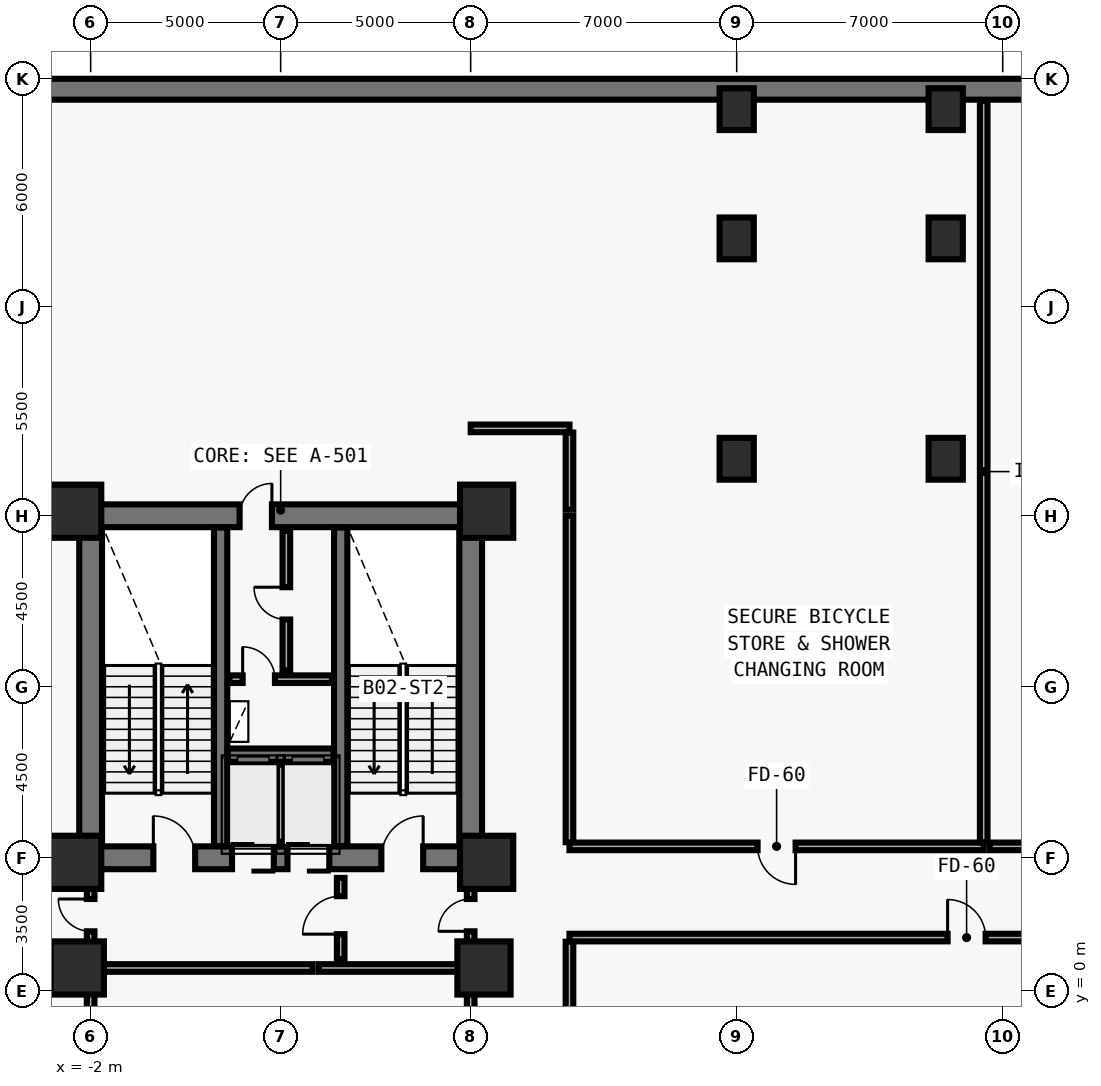
"""IFC4 building model, lengths in metres.
Left out: names, types, materials, properties, quantities, classifications, styles, units other than length and angle.
Written with IfcOpenShell. Run it as: python <this file> out.ifc"""

import sys

from ifc_helpers import new_model, si_unit, direction, frame, frame_2d, origin, origin_2d, place, context, subcontext, project, spatial, rectangle, extrude, element, fill, save


model = new_model("IFC4")
c1 = context("Model", 3, precision=1e-05, world=origin(), true_north=direction((0.0, 1.0)))
c2 = subcontext(c1, "Body", "Model", "MODEL_VIEW")
j1 = project(units=[si_unit("LENGTHUNIT", "METRE"), si_unit("PLANEANGLEUNIT", "RADIAN")], contexts=[c1])
p1 = place(None, origin())
s1 = spatial("IfcSite", under=j1, at=p1, CompositionType="ELEMENT")
p2 = place(p1, origin())
s2 = spatial("IfcBuilding", under=s1, at=p2, CompositionType="ELEMENT")
p3 = place(p2, frame((0.0, 0.0, -9.0)))
s3 = spatial("IfcBuildingStorey", under=s2, at=p3, CompositionType="ELEMENT", Elevation=-9.0)
p4 = place(p3, frame((-2.0, 3.5, 0.0), z_axis=(0.0, 0.0, 1.0), x_axis=(1.0, 0.0, 0.0)))
e1 = element("IfcWall", 1, at=p4, inside=s3, PredefinedType="SHEAR", context=c2, shape_type="SweptSolid", body=[
    extrude(rectangle(XDim=10.0, YDim=0.6, at=frame_2d((5.0, 0.0))), origin(), (0.0, 0.0, 1.0), 4.492),
])
p5 = place(p4, frame((1.65, 0.0, 0.0)))
e2 = element("IfcOpeningElement", 2, at=p5, cuts=e1, PredefinedType="OPENING", context=c2, shape_type="SweptSolid", body=[
    extrude(rectangle(XDim=1.1, YDim=2.15, at=frame_2d((0.55, 1.075))), frame((0.0, 0.31, 0.0), z_axis=(0.0, -1.0, 0.0), x_axis=(1.0, 0.0, 0.0)), (0.0, 0.0, 1.0), 0.62),
])
p6 = place(p4, frame((7.65, 0.0, 0.0)))
e3 = element("IfcOpeningElement", 3, at=p6, cuts=e1, PredefinedType="OPENING", context=c2, shape_type="SweptSolid", body=[
    extrude(rectangle(XDim=1.1, YDim=2.15, at=frame_2d((0.55, 1.075))), frame((0.0, 0.31, 0.0), z_axis=(0.0, -1.0, 0.0), x_axis=(1.0, 0.0, 0.0)), (0.0, 0.0, 1.0), 0.62),
])
p7 = place(p4, frame((3.72, 0.0, 0.0)))
e4 = element("IfcOpeningElement", 4, at=p7, cuts=e1, PredefinedType="OPENING", context=c2, shape_type="SweptSolid", body=[
    extrude(rectangle(XDim=1.1, YDim=2.2, at=frame_2d((0.55, 1.1))), frame((0.0, 0.31, 0.0), z_axis=(0.0, -1.0, 0.0), x_axis=(1.0, 0.0, 0.0)), (0.0, 0.0, 1.0), 0.62),
])
p8 = place(p4, frame((5.18, 0.0, 0.0)))
e5 = element("IfcOpeningElement", 5, at=p8, cuts=e1, PredefinedType="OPENING", context=c2, shape_type="SweptSolid", body=[
    extrude(rectangle(XDim=1.1, YDim=2.2, at=frame_2d((0.55, 1.1))), frame((0.0, 0.31, 0.0), z_axis=(0.0, -1.0, 0.0), x_axis=(1.0, 0.0, 0.0)), (0.0, 0.0, 1.0), 0.62),
])
p9 = place(p3, frame((-2.0, 12.5, 0.0), z_axis=(0.0, 0.0, 1.0), x_axis=(1.0, 0.0, 0.0)))
e6 = element("IfcWall", 6, at=p9, inside=s3, PredefinedType="SHEAR", context=c2, shape_type="SweptSolid", body=[
    extrude(rectangle(XDim=10.0, YDim=0.6, at=frame_2d((5.0, 0.0))), origin(), (0.0, 0.0, 1.0), 4.492),
])
p10 = place(p9, frame((3.92, 0.0, 0.0)))
e7 = element("IfcOpeningElement", 7, at=p10, cuts=e6, PredefinedType="OPENING", context=c2, shape_type="SweptSolid", body=[
    extrude(rectangle(XDim=0.85, YDim=2.1, at=frame_2d((0.425, 1.05))), frame((0.0, 0.31, 0.0), z_axis=(0.0, -1.0, 0.0), x_axis=(1.0, 0.0, 0.0)), (0.0, 0.0, 1.0), 0.62),
])
for number, where, z_axis, x_axis in (
    (8, (-2.0, 3.81, 0.0), (0.0, 0.0, 1.0), (0.0, 1.0, 0.0)),
    (9, (8.0, 3.81, 0.0), (0.0, 0.0, 1.0), (0.0, 1.0, 0.0)),
):
    element("IfcWall", number, at=place(p3, frame(where, z_axis=z_axis, x_axis=x_axis)), inside=s3, PredefinedType="SHEAR", context=c2, shape_type="SweptSolid", body=[
        extrude(rectangle(XDim=8.38, YDim=0.6, at=frame_2d((4.19, 0.0))), origin(), (0.0, 0.0, 1.0), 4.492),
    ])
for number, where, z_axis, x_axis in (
    (10, (1.42, 3.81, 0.0), (0.0, 0.0, 1.0), (0.0, 1.0, 0.0)),
    (11, (4.58, 3.81, 0.0), (0.0, 0.0, 1.0), (0.0, 1.0, 0.0)),
):
    element("IfcWall", number, at=place(p3, frame(where, z_axis=z_axis, x_axis=x_axis)), inside=s3, PredefinedType="SHEAR", context=c2, shape_type="SweptSolid", body=[
        extrude(rectangle(XDim=8.38, YDim=0.35, at=frame_2d((4.19, 0.0))), origin(), (0.0, 0.0, 1.0), 4.492),
    ])
p11 = place(p3, frame((1.61, 6.2, 0.0), z_axis=(0.0, 0.0, 1.0), x_axis=(1.0, 0.0, 0.0)))
e12 = element("IfcWall", 12, at=p11, inside=s3, PredefinedType="SHEAR", context=c2, shape_type="SweptSolid", body=[
    extrude(rectangle(XDim=2.78, YDim=0.35, at=frame_2d((1.39, 0.0))), origin(), (0.0, 0.0, 1.0), 4.492),
])
p12 = place(p3, frame((-33.725, 23.725, 0.0), z_axis=(0.0, 0.0, 1.0), x_axis=(1.0, 0.0, 0.0)))
e13 = element("IfcWall", 13, at=p12, inside=s3, PredefinedType="SOLIDWALL", context=c2, shape_type="SweptSolid", body=[
    extrude(rectangle(XDim=67.45, YDim=0.55, at=frame_2d((33.725, 0.0))), origin(), (0.0, 0.0, 1.0), 4.492),
])
for number, where, z_axis, x_axis in (
    (14, (-2.42, 12.62, 0.0), (0.0, 0.0, 1.0), (1.0, 0.0, 0.0)),
    (15, (8.42, 12.62, 0.0), (0.0, 0.0, 1.0), (1.0, 0.0, 0.0)),
    (16, (-2.42, 3.38, 0.0), (0.0, 0.0, 1.0), (1.0, 0.0, 0.0)),
    (17, (8.42, 3.38, 0.0), (0.0, 0.0, 1.0), (1.0, 0.0, 0.0)),
    (18, (-2.35, 0.6, 0.0), (0.0, 0.0, 1.0), (1.0, 0.0, 0.0)),
    (19, (8.35, 0.6, 0.0), (0.0, 0.0, 1.0), (1.0, 0.0, 0.0)),
):
    element("IfcColumn", number, at=place(p3, frame(where, z_axis=z_axis, x_axis=x_axis)), inside=s3, PredefinedType="COLUMN", context=c2, shape_type="SweptSolid", body=[
        extrude(rectangle(XDim=1.4, YDim=1.4, at=origin_2d()), origin(), (0.0, 0.0, 1.0), 4.475),
    ])
for number, where, z_axis, x_axis in (
    (20, (15.0, 14.0, 0.0), (0.0, 0.0, 1.0), (1.0, 0.0, 0.0)),
    (21, (15.0, 19.8, 0.0), (0.0, 0.0, 1.0), (1.0, 0.0, 0.0)),
    (22, (15.0, 23.2, 0.0), (0.0, 0.0, 1.0), (1.0, 0.0, 0.0)),
    (23, (20.5, 14.0, 0.0), (0.0, 0.0, 1.0), (1.0, 0.0, 0.0)),
    (24, (20.5, 19.8, 0.0), (0.0, 0.0, 1.0), (1.0, 0.0, 0.0)),
    (25, (20.5, 23.2, 0.0), (0.0, 0.0, 1.0), (1.0, 0.0, 0.0)),
):
    element("IfcColumn", number, at=place(p3, frame(where, z_axis=z_axis, x_axis=x_axis)), inside=s3, PredefinedType="COLUMN", context=c2, shape_type="SweptSolid", body=[
        extrude(rectangle(XDim=0.9, YDim=1.1, at=origin_2d()), origin(), (0.0, 0.0, 1.0), 4.475),
    ])
p13 = place(p3, frame((3.0, 3.92, 0.0), z_axis=(0.0, 0.0, 1.0), x_axis=(0.0, 1.0, 0.0)))
e26 = element("IfcWall", 26, at=p13, inside=s3, PredefinedType="SOLIDWALL", context=c2, shape_type="SweptSolid", body=[
    extrude(rectangle(XDim=2.03, YDim=0.2, at=frame_2d((1.015, 0.0))), origin(), (0.0, 0.0, 1.0), 4.18),
])
p14 = place(p3, frame((4.0, 0.6, 0.0), z_axis=(0.0, 0.0, 1.0), x_axis=(1.0, 0.0, 0.0)))
e27 = element("IfcWall", 27, at=p14, inside=s3, PredefinedType="SOLIDWALL", context=c2, shape_type="SweptSolid", body=[
    extrude(rectangle(XDim=3.88, YDim=0.2, at=frame_2d((1.94, 0.0))), origin(), (0.0, 0.0, 1.0), 3.362),
])
p15 = place(p3, frame((1.65, 8.2, 0.0), z_axis=(0.0, 0.0, 1.0), x_axis=(1.0, 0.0, 0.0)))
e28 = element("IfcWall", 28, at=p15, inside=s3, PredefinedType="MOVABLE", context=c2, shape_type="SweptSolid", body=[
    extrude(rectangle(XDim=2.7, YDim=0.2, at=frame_2d((1.35, 0.0))), origin(), (0.0, 0.0, 1.0), 4.18),
])
p16 = place(p15, frame((0.35, 0.0, 0.0)))
e29 = element("IfcOpeningElement", 29, at=p16, cuts=e28, PredefinedType="OPENING", context=c2, shape_type="SweptSolid", body=[
    extrude(rectangle(XDim=0.85, YDim=2.1, at=frame_2d((0.425, 1.05))), frame((0.0, 0.11, 0.0), z_axis=(0.0, -1.0, 0.0), x_axis=(1.0, 0.0, 0.0)), (0.0, 0.0, 1.0), 0.22),
])
p17 = place(p3, frame((3.15, 8.43, 0.0), z_axis=(0.0, 0.0, 1.0), x_axis=(0.0, 1.0, 0.0)))
e30 = element("IfcWall", 30, at=p17, inside=s3, PredefinedType="MOVABLE", context=c2, shape_type="SweptSolid", body=[
    extrude(rectangle(XDim=3.67, YDim=0.2, at=frame_2d((1.835, 0.0))), origin(), (0.0, 0.0, 1.0), 4.18),
])
p18 = place(p17, frame((1.34, 0.0, 0.0)))
e31 = element("IfcOpeningElement", 31, at=p18, cuts=e30, PredefinedType="OPENING", context=c2, shape_type="SweptSolid", body=[
    extrude(rectangle(XDim=0.85, YDim=2.1, at=frame_2d((0.425, 1.05))), frame((0.0, 0.11, 0.0), z_axis=(0.0, -1.0, 0.0), x_axis=(1.0, 0.0, 0.0)), (0.0, 0.0, 1.0), 0.22),
])
p19 = place(p3, frame((4.58, 0.83, 0.0), z_axis=(0.0, 0.0, 1.0), x_axis=(0.0, 1.0, 0.0)))
e32 = element("IfcWall", 32, at=p19, inside=s3, PredefinedType="MOVABLE", context=c2, shape_type="SweptSolid", body=[
    extrude(rectangle(XDim=2.14, YDim=0.2, at=frame_2d((1.07, 0.0))), origin(), (0.0, 0.0, 1.0), 4.18),
])
p20 = place(p19, frame((0.66, 0.0, 0.0)))
e33 = element("IfcOpeningElement", 33, at=p20, cuts=e32, PredefinedType="OPENING", context=c2, shape_type="SweptSolid", body=[
    extrude(rectangle(XDim=1.0, YDim=2.1, at=frame_2d((0.5, 1.05))), frame((0.0, 0.11, 0.0), z_axis=(0.0, -1.0, 0.0), x_axis=(1.0, 0.0, 0.0)), (0.0, 0.0, 1.0), 0.22),
])
p21 = place(p3, frame((-2.0, 0.72, 0.0), z_axis=(0.0, 0.0, 1.0), x_axis=(0.0, 1.0, 0.0)))
e34 = element("IfcWall", 34, at=p21, inside=s3, PredefinedType="MOVABLE", context=c2, shape_type="SweptSolid", body=[
    extrude(rectangle(XDim=2.25, YDim=0.2, at=frame_2d((1.125, 0.0))), origin(), (0.0, 0.0, 1.0), 3.262),
])
p22 = place(p21, frame((0.845, 0.0, 0.0)))
e35 = element("IfcOpeningElement", 35, at=p22, cuts=e34, PredefinedType="OPENING", context=c2, shape_type="SweptSolid", body=[
    extrude(rectangle(XDim=0.85, YDim=2.1, at=frame_2d((0.425, 1.05))), frame((0.0, 0.11, 0.0), z_axis=(0.0, -1.0, 0.0), x_axis=(1.0, 0.0, 0.0)), (0.0, 0.0, 1.0), 0.22),
])
p23 = place(p3, frame((8.0, 0.72, 0.0), z_axis=(0.0, 0.0, 1.0), x_axis=(0.0, 1.0, 0.0)))
e36 = element("IfcWall", 36, at=p23, inside=s3, PredefinedType="MOVABLE", context=c2, shape_type="SweptSolid", body=[
    extrude(rectangle(XDim=2.25, YDim=0.2, at=frame_2d((1.125, 0.0))), origin(), (0.0, 0.0, 1.0), 3.262),
])
p24 = place(p23, frame((0.845, 0.0, 0.0)))
e37 = element("IfcOpeningElement", 37, at=p24, cuts=e36, PredefinedType="OPENING", context=c2, shape_type="SweptSolid", body=[
    extrude(rectangle(XDim=0.85, YDim=2.1, at=frame_2d((0.425, 1.05))), frame((0.0, 0.11, 0.0), z_axis=(0.0, -1.0, 0.0), x_axis=(1.0, 0.0, 0.0)), (0.0, 0.0, 1.0), 0.22),
])
p25 = place(p3, frame((10.6, 1.4, 0.0), z_axis=(0.0, 0.0, 1.0), x_axis=(1.0, 0.0, 0.0)))
e38 = element("IfcWall", 38, at=p25, inside=s3, PredefinedType="MOVABLE", context=c2, shape_type="SweptSolid", body=[
    extrude(rectangle(XDim=20.9, YDim=0.2, at=frame_2d((10.45, 0.0))), origin(), (0.0, 0.0, 1.0), 4.18),
])
p26 = place(p25, frame((9.95, 0.0, 0.0)))
e39 = element("IfcOpeningElement", 39, at=p26, cuts=e38, PredefinedType="OPENING", context=c2, shape_type="SweptSolid", body=[
    extrude(rectangle(XDim=1.0, YDim=2.1, at=frame_2d((0.5, 1.05))), frame((0.0, 0.11, 0.0), z_axis=(0.0, -1.0, 0.0), x_axis=(1.0, 0.0, 0.0)), (0.0, 0.0, 1.0), 0.22),
])
p27 = place(p3, frame((21.5, 3.8, 0.0), z_axis=(0.0, 0.0, 1.0), x_axis=(-1.0, 0.0, 0.0)))
e40 = element("IfcWall", 40, at=p27, inside=s3, PredefinedType="MOVABLE", context=c2, shape_type="SweptSolid", body=[
    extrude(rectangle(XDim=10.9, YDim=0.2, at=frame_2d((5.45, 0.0))), origin(), (0.0, 0.0, 1.0), 4.18),
])
p28 = place(p27, frame((4.95, 0.0, 0.0)))
e41 = element("IfcOpeningElement", 41, at=p28, cuts=e40, PredefinedType="OPENING", context=c2, shape_type="SweptSolid", body=[
    extrude(rectangle(XDim=1.0, YDim=2.1, at=frame_2d((0.5, 1.05))), frame((0.0, 0.11, 0.0), z_axis=(0.0, -1.0, 0.0), x_axis=(1.0, 0.0, 0.0)), (0.0, 0.0, 1.0), 0.22),
])
p29 = place(p3, frame((31.5, 3.8, 0.0), z_axis=(0.0, 0.0, 1.0), x_axis=(-1.0, 0.0, 0.0)))
e42 = element("IfcWall", 42, at=p29, inside=s3, PredefinedType="MOVABLE", context=c2, shape_type="SweptSolid", body=[
    extrude(rectangle(XDim=9.84, YDim=0.2, at=frame_2d((4.92, 0.0))), origin(), (0.0, 0.0, 1.0), 4.18),
])
p30 = place(p29, frame((4.5, 0.0, 0.0)))
e43 = element("IfcOpeningElement", 43, at=p30, cuts=e42, PredefinedType="OPENING", context=c2, shape_type="SweptSolid", body=[
    extrude(rectangle(XDim=1.0, YDim=2.1, at=frame_2d((0.5, 1.05))), frame((0.0, 0.11, 0.0), z_axis=(0.0, -1.0, 0.0), x_axis=(1.0, 0.0, 0.0)), (0.0, 0.0, 1.0), 0.22),
])
p31 = place(p3, frame((-1.88, 0.6, 0.0), z_axis=(0.0, 0.0, 1.0), x_axis=(1.0, 0.0, 0.0)))
e44 = element("IfcWall", 44, at=p31, inside=s3, PredefinedType="MOVABLE", context=c2, shape_type="SweptSolid", body=[
    extrude(rectangle(XDim=5.72, YDim=0.2, at=frame_2d((2.86, 0.0))), origin(), (0.0, 0.0, 1.0), 3.362),
])
for number, where, z_axis, x_axis in (
    (45, (-2.0, -4.09, 0.0), (0.0, 0.0, 1.0), (0.0, 1.0, 0.0)),
    (46, (8.0, -4.09, 0.0), (0.0, 0.0, 1.0), (0.0, 1.0, 0.0)),
):
    element("IfcWall", number, at=place(p3, frame(where, z_axis=z_axis, x_axis=x_axis)), inside=s3, PredefinedType="MOVABLE", context=c2, shape_type="SweptSolid", body=[
        extrude(rectangle(XDim=4.59, YDim=0.2, at=frame_2d((2.295, 0.0))), origin(), (0.0, 0.0, 1.0), 3.362),
    ])
p32 = place(p3, frame((10.6, -4.2, 0.0), z_axis=(0.0, 0.0, 1.0), x_axis=(0.0, 1.0, 0.0)))
e47 = element("IfcWall", 47, at=p32, inside=s3, PredefinedType="MOVABLE", context=c2, shape_type="SweptSolid", body=[
    extrude(rectangle(XDim=5.49, YDim=0.2, at=frame_2d((2.745, 0.0))), origin(), (0.0, 0.0, 1.0), 4.18),
])
p33 = place(p3, frame((-2.36, 3.8, 0.0), z_axis=(0.0, 0.0, 1.0), x_axis=(-1.0, 0.0, 0.0)))
e48 = element("IfcWall", 48, at=p33, inside=s3, PredefinedType="MOVABLE", context=c2, shape_type="SweptSolid", body=[
    extrude(rectangle(XDim=2.08, YDim=0.2, at=frame_2d((1.04, 0.0))), origin(), (0.0, 0.0, 1.0), 4.18),
])
p34 = place(p3, frame((10.6, 3.91, 0.0), z_axis=(0.0, 0.0, 1.0), x_axis=(0.0, 1.0, 0.0)))
e49 = element("IfcWall", 49, at=p34, inside=s3, PredefinedType="MOVABLE", context=c2, shape_type="SweptSolid", body=[
    extrude(rectangle(XDim=8.59, YDim=0.2, at=frame_2d((4.295, 0.0))), origin(), (0.0, 0.0, 1.0), 4.18),
])
p35 = place(p3, frame((10.6, 14.8, 0.0), z_axis=(0.0, 0.0, 1.0), x_axis=(-1.0, 0.0, 0.0)))
e50 = element("IfcWall", 50, at=p35, inside=s3, PredefinedType="MOVABLE", context=c2, shape_type="SweptSolid", body=[
    extrude(rectangle(XDim=2.6, YDim=0.2, at=frame_2d((1.3, 0.0))), origin(), (0.0, 0.0, 1.0), 4.18),
])
p36 = place(p3, frame((10.6, 12.66, 0.0), z_axis=(0.0, 0.0, 1.0), x_axis=(0.0, 1.0, 0.0)))
e51 = element("IfcWall", 51, at=p36, inside=s3, PredefinedType="MOVABLE", context=c2, shape_type="SweptSolid", body=[
    extrude(rectangle(XDim=2.03, YDim=0.2, at=frame_2d((1.015, 0.0))), origin(), (0.0, 0.0, 1.0), 4.18),
])
p37 = place(p3, frame((21.5, 23.415, 0.0), z_axis=(0.0, 0.0, 1.0), x_axis=(0.0, -1.0, 0.0)))
e52 = element("IfcWall", 52, at=p37, inside=s3, PredefinedType="MOVABLE", context=c2, shape_type="SweptSolid", body=[
    extrude(rectangle(XDim=19.505, YDim=0.2, at=frame_2d((9.752, 0.0))), origin(), (0.0, 0.0, 1.0), 4.18),
])
p38 = place(p5, origin())
e53 = element("IfcDoor", 53, at=p38, inside=s3, OperationType="SINGLE_SWING_LEFT", PredefinedType="DOOR", context=c2, shape_type="SweptSolid", body=[
    extrude(rectangle(XDim=1.1, YDim=2.15, at=frame_2d((0.55, 1.075))), frame((0.0, 0.025, 0.0), z_axis=(0.0, -1.0, 0.0), x_axis=(1.0, 0.0, 0.0)), (0.0, 0.0, 1.0), 0.05),
])
fill(e2, e53)
p39 = place(p6, origin())
e54 = element("IfcDoor", 54, at=p39, inside=s3, OperationType="SINGLE_SWING_RIGHT", PredefinedType="DOOR", context=c2, shape_type="SweptSolid", body=[
    extrude(rectangle(XDim=1.1, YDim=2.15, at=frame_2d((0.55, 1.075))), frame((0.0, 0.025, 0.0), z_axis=(0.0, -1.0, 0.0), x_axis=(1.0, 0.0, 0.0)), (0.0, 0.0, 1.0), 0.05),
])
fill(e3, e54)
p40 = place(p7, origin())
e55 = element("IfcDoor", 55, at=p40, inside=s3, OperationType="DOUBLE_DOOR_SLIDING", PredefinedType="DOOR", context=c2, shape_type="SweptSolid", body=[
    extrude(rectangle(XDim=1.1, YDim=2.2, at=frame_2d((0.55, 1.1))), frame((0.0, 0.025, 0.0), z_axis=(0.0, -1.0, 0.0), x_axis=(1.0, 0.0, 0.0)), (0.0, 0.0, 1.0), 0.05),
])
fill(e4, e55)
p41 = place(p8, origin())
e56 = element("IfcDoor", 56, at=p41, inside=s3, OperationType="DOUBLE_DOOR_SLIDING", PredefinedType="DOOR", context=c2, shape_type="SweptSolid", body=[
    extrude(rectangle(XDim=1.1, YDim=2.2, at=frame_2d((0.55, 1.1))), frame((0.0, 0.025, 0.0), z_axis=(0.0, -1.0, 0.0), x_axis=(1.0, 0.0, 0.0)), (0.0, 0.0, 1.0), 0.05),
])
fill(e5, e56)
p42 = place(p10, origin())
e57 = element("IfcDoor", 57, at=p42, inside=s3, OperationType="SINGLE_SWING_RIGHT", PredefinedType="DOOR", context=c2, shape_type="SweptSolid", body=[
    extrude(rectangle(XDim=0.85, YDim=2.1, at=frame_2d((0.425, 1.05))), frame((0.0, 0.025, 0.0), z_axis=(0.0, -1.0, 0.0), x_axis=(1.0, 0.0, 0.0)), (0.0, 0.0, 1.0), 0.05),
])
fill(e7, e57)
p43 = place(p16, origin())
e58 = element("IfcDoor", 58, at=p43, inside=s3, OperationType="SINGLE_SWING_LEFT", PredefinedType="DOOR", context=c2, shape_type="SweptSolid", body=[
    extrude(rectangle(XDim=0.85, YDim=2.1, at=frame_2d((0.425, 1.05))), frame((0.0, 0.025, 0.0), z_axis=(0.0, -1.0, 0.0), x_axis=(1.0, 0.0, 0.0)), (0.0, 0.0, 1.0), 0.05),
])
fill(e29, e58)
p44 = place(p18, origin())
e59 = element("IfcDoor", 59, at=p44, inside=s3, OperationType="SINGLE_SWING_RIGHT", PredefinedType="DOOR", context=c2, shape_type="SweptSolid", body=[
    extrude(rectangle(XDim=0.85, YDim=2.1, at=frame_2d((0.425, 1.05))), frame((0.0, 0.025, 0.0), z_axis=(0.0, -1.0, 0.0), x_axis=(1.0, 0.0, 0.0)), (0.0, 0.0, 1.0), 0.05),
])
fill(e31, e59)
p45 = place(p20, origin())
e60 = element("IfcDoor", 60, at=p45, inside=s3, OperationType="SINGLE_SWING_LEFT", PredefinedType="DOOR", context=c2, shape_type="SweptSolid", body=[
    extrude(rectangle(XDim=1.0, YDim=2.1, at=frame_2d((0.5, 1.05))), frame((0.0, 0.025, 0.0), z_axis=(0.0, -1.0, 0.0), x_axis=(1.0, 0.0, 0.0)), (0.0, 0.0, 1.0), 0.05),
])
fill(e33, e60)
p46 = place(p22, origin())
e61 = element("IfcDoor", 61, at=p46, inside=s3, OperationType="SINGLE_SWING_RIGHT", PredefinedType="DOOR", context=c2, shape_type="SweptSolid", body=[
    extrude(rectangle(XDim=0.85, YDim=2.1, at=frame_2d((0.425, 1.05))), frame((0.0, 0.025, 0.0), z_axis=(0.0, -1.0, 0.0), x_axis=(1.0, 0.0, 0.0)), (0.0, 0.0, 1.0), 0.05),
])
fill(e35, e61)
p47 = place(p24, origin())
e62 = element("IfcDoor", 62, at=p47, inside=s3, OperationType="SINGLE_SWING_LEFT", PredefinedType="DOOR", context=c2, shape_type="SweptSolid", body=[
    extrude(rectangle(XDim=0.85, YDim=2.1, at=frame_2d((0.425, 1.05))), frame((0.0, 0.025, 0.0), z_axis=(0.0, -1.0, 0.0), x_axis=(1.0, 0.0, 0.0)), (0.0, 0.0, 1.0), 0.05),
])
fill(e37, e62)
p48 = place(p26, origin())
e63 = element("IfcDoor", 63, at=p48, inside=s3, OperationType="SINGLE_SWING_LEFT", PredefinedType="DOOR", context=c2, shape_type="SweptSolid", body=[
    extrude(rectangle(XDim=1.0, YDim=2.1, at=frame_2d((0.5, 1.05))), frame((0.0, 0.025, 0.0), z_axis=(0.0, -1.0, 0.0), x_axis=(1.0, 0.0, 0.0)), (0.0, 0.0, 1.0), 0.05),
])
fill(e39, e63)
p49 = place(p28, origin())
e64 = element("IfcDoor", 64, at=p49, inside=s3, OperationType="SINGLE_SWING_LEFT", PredefinedType="DOOR", context=c2, shape_type="SweptSolid", body=[
    extrude(rectangle(XDim=1.0, YDim=2.1, at=frame_2d((0.5, 1.05))), frame((0.0, 0.025, 0.0), z_axis=(0.0, -1.0, 0.0), x_axis=(1.0, 0.0, 0.0)), (0.0, 0.0, 1.0), 0.05),
])
fill(e41, e64)
save(model, sys.argv[1])
